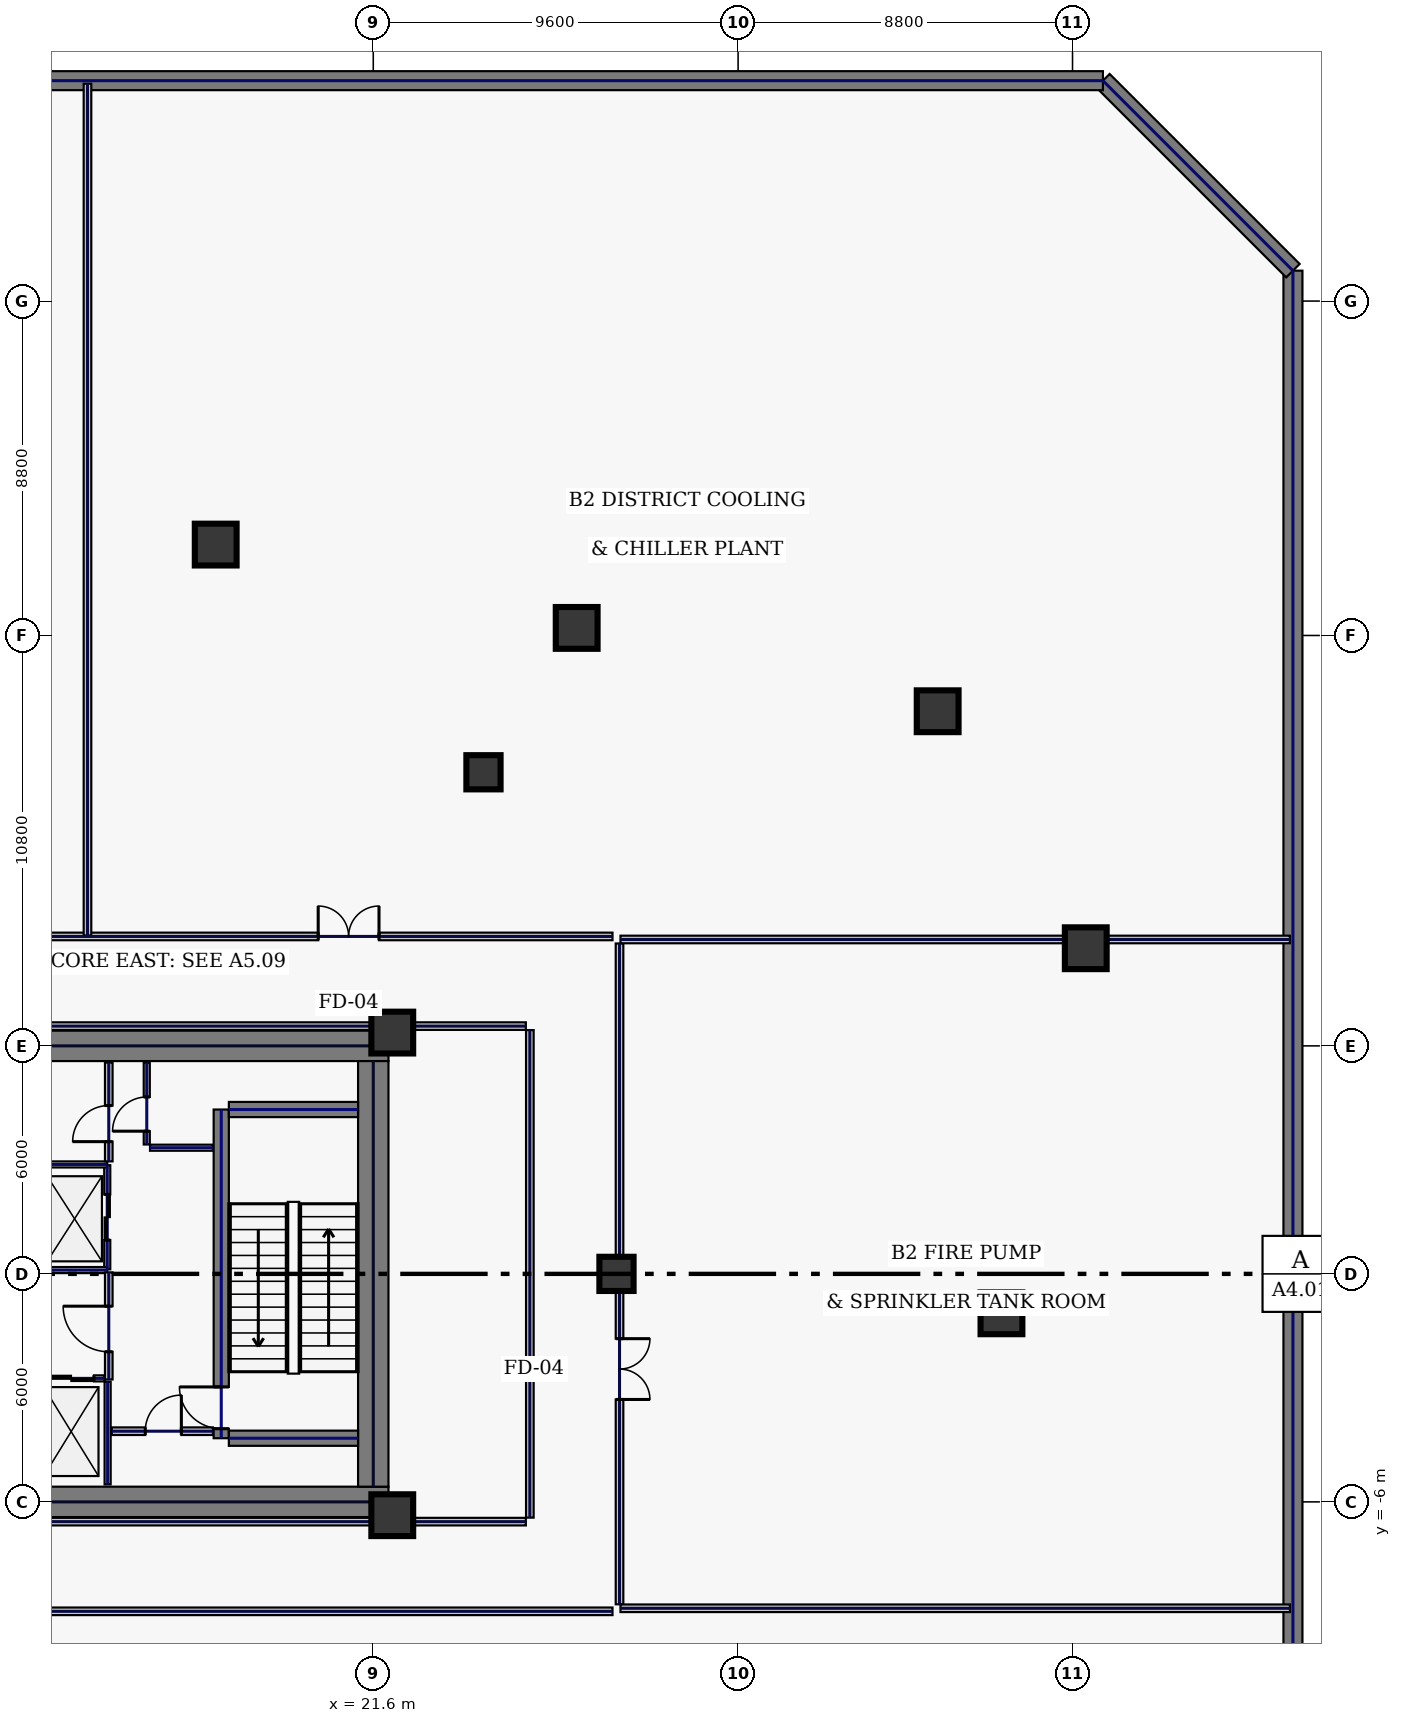
"""IFC4 building model, lengths in metres.
Left out: names, types, materials, properties, quantities, classifications, styles, units other than length and angle.
Written with IfcOpenShell. Run it as: python <this file> out.ifc"""

import sys

from ifc_helpers import new_model, si_unit, direction, frame, frame_2d, origin, origin_2d, place, context, subcontext, project, spatial, rectangle, extrude, element, fill, save


model = new_model("IFC4")
c1 = context("Model", 3, precision=1e-05, world=origin(), true_north=direction((0.0, 1.0)))
c2 = subcontext(c1, "Body", "Model", "MODEL_VIEW")
j1 = project(units=[si_unit("LENGTHUNIT", "METRE"), si_unit("PLANEANGLEUNIT", "RADIAN")], contexts=[c1])
p1 = place(None, origin())
s1 = spatial("IfcSite", under=j1, at=p1, CompositionType="ELEMENT")
p2 = place(p1, origin())
s2 = spatial("IfcBuilding", under=s1, at=p2, CompositionType="ELEMENT")
p3 = place(p2, frame((0.0, 0.0, -10.2)))
s3 = spatial("IfcBuildingStorey", under=s2, at=p3, CompositionType="ELEMENT", Elevation=-10.2)
p4 = place(p3, frame((45.8, -29.8, 0.0), z_axis=(0.0, 0.0, 1.0), x_axis=(0.0, 1.0, 0.0)))
e1 = element("IfcWall", 1, at=p4, inside=s3, PredefinedType="SHEAR", context=c2, shape_type="SweptSolid", body=[
    extrude(rectangle(XDim=56.2, YDim=0.5, at=frame_2d((28.1, 0.0))), origin(), (0.0, 0.0, 1.0), 4.45),
])
p5 = place(p3, frame((45.8, 26.4, 0.0), z_axis=(0.0, 0.0, 1.0), x_axis=(-0.707106781187, 0.707106781187, 0.0)))
e2 = element("IfcWall", 2, at=p5, inside=s3, PredefinedType="SHEAR", context=c2, shape_type="SweptSolid", body=[
    extrude(rectangle(XDim=7.071, YDim=0.5, at=frame_2d((3.536, 0.0))), origin(), (0.0, 0.0, 1.0), 4.45),
])
p6 = place(p3, frame((40.8, 31.4, 0.0), z_axis=(0.0, 0.0, 1.0), x_axis=(-1.0, 0.0, 0.0)))
e3 = element("IfcWall", 3, at=p6, inside=s3, PredefinedType="SHEAR", context=c2, shape_type="SweptSolid", body=[
    extrude(rectangle(XDim=81.6, YDim=0.5, at=frame_2d((40.8, 0.0))), origin(), (0.0, 0.0, 1.0), 4.45),
])
for number, where, z_axis, x_axis in (
    (4, (10.4, 6.0, 0.0), (0.0, 0.0, 1.0), (1.0, 0.0, 0.0)),
    (5, (10.4, -6.0, 0.0), (0.0, 0.0, 1.0), (1.0, 0.0, 0.0)),
):
    element("IfcWall", number, at=place(p3, frame(where, z_axis=z_axis, x_axis=x_axis)), inside=s3, PredefinedType="SHEAR", context=c2, shape_type="SweptSolid", body=[
        extrude(rectangle(XDim=11.6, YDim=0.8, at=frame_2d((5.8, 0.0))), origin(), (0.0, 0.0, 1.0), 4.45),
    ])
p7 = place(p3, frame((21.6, -5.6, 0.0), z_axis=(0.0, 0.0, 1.0), x_axis=(0.0, 1.0, 0.0)))
e6 = element("IfcWall", 6, at=p7, inside=s3, PredefinedType="SHEAR", context=c2, shape_type="SweptSolid", body=[
    extrude(rectangle(XDim=11.2, YDim=0.8, at=frame_2d((5.6, 0.0))), origin(), (0.0, 0.0, 1.0), 4.45),
])
p8 = place(p3, frame((17.6, -4.325, 0.0), z_axis=(0.0, 0.0, 1.0), x_axis=(0.0, 1.0, 0.0)))
e7 = element("IfcWall", 7, at=p8, inside=s3, PredefinedType="SHEAR", context=c2, shape_type="SweptSolid", body=[
    extrude(rectangle(XDim=8.65, YDim=0.4, at=frame_2d((4.325, 0.0))), origin(), (0.0, 0.0, 1.0), 4.45),
])
p9 = place(p8, frame((0.25, 0.0, 0.0)))
e8 = element("IfcOpeningElement", 8, at=p9, cuts=e7, PredefinedType="OPENING", context=c2, shape_type="SweptSolid", body=[
    extrude(rectangle(XDim=1.1, YDim=2.2, at=frame_2d((0.55, 1.1))), frame((0.0, 0.21, 0.0), z_axis=(0.0, -1.0, 0.0), x_axis=(1.0, 0.0, 0.0)), (0.0, 0.0, 1.0), 0.42),
])
for number, where, z_axis, x_axis in (
    (9, (17.8, -4.325, 0.0), (0.0, 0.0, 1.0), (1.0, 0.0, 0.0)),
    (10, (17.8, 4.325, 0.0), (0.0, 0.0, 1.0), (1.0, 0.0, 0.0)),
):
    element("IfcWall", number, at=place(p3, frame(where, z_axis=z_axis, x_axis=x_axis)), inside=s3, PredefinedType="SHEAR", context=c2, shape_type="SweptSolid", body=[
        extrude(rectangle(XDim=3.4, YDim=0.4, at=frame_2d((1.7, 0.0))), origin(), (0.0, 0.0, 1.0), 4.45),
    ])
for number, where, z_axis, x_axis in (
    (11, (22.1, -6.35, 0.0), (0.0, 0.0, 1.0), (1.0, 0.0, 0.0)),
    (12, (22.1, 6.35, 0.0), (0.0, 0.0, 1.0), (1.0, 0.0, 0.0)),
):
    element("IfcColumn", number, at=place(p3, frame(where, z_axis=z_axis, x_axis=x_axis)), inside=s3, PredefinedType="COLUMN", context=c2, shape_type="SweptSolid", body=[
        extrude(rectangle(XDim=1.1, YDim=1.1, at=origin_2d()), origin(), (0.0, 0.0, 1.0), 4.45),
    ])
for number, where, z_axis, x_axis in (
    (13, (24.5, 13.2, 0.0), (0.0, 0.0, 1.0), (1.0, 0.0, 0.0)),
    (14, (28.0, 0.0, 0.0), (0.0, 0.0, 1.0), (1.0, 0.0, 0.0)),
):
    element("IfcColumn", number, at=place(p3, frame(where, z_axis=z_axis, x_axis=x_axis)), inside=s3, PredefinedType="COLUMN", context=c2, shape_type="SweptSolid", body=[
        extrude(rectangle(XDim=0.9, YDim=0.9, at=origin_2d()), origin(), (0.0, 0.0, 1.0), 4.45),
    ])
for number, where, z_axis, x_axis in (
    (15, (36.451, 14.806, 0.0), (0.0, 0.0, 1.0), (1.0, 0.0, 0.0)),
    (16, (26.952, 16.999, 0.0), (0.0, 0.0, 1.0), (1.0, 0.0, 0.0)),
    (17, (17.454, 19.192, 0.0), (0.0, 0.0, 1.0), (1.0, 0.0, 0.0)),
    (18, (38.13, -1.038, 0.0), (0.0, 0.0, 1.0), (1.0, 0.0, 0.0)),
    (19, (40.348, 8.57, 0.0), (0.0, 0.0, 1.0), (1.0, 0.0, 0.0)),
):
    element("IfcColumn", number, at=place(p3, frame(where, z_axis=z_axis, x_axis=x_axis)), inside=s3, PredefinedType="COLUMN", context=c2, shape_type="SweptSolid", body=[
        extrude(rectangle(XDim=1.1, YDim=1.1, at=origin_2d()), origin(), (0.0, 0.0, 1.0), 4.45),
    ])
p10 = place(p3, frame((14.6, 0.12, 0.0), z_axis=(0.0, 0.0, 1.0), x_axis=(0.0, 1.0, 0.0)))
e20 = element("IfcWall", 20, at=p10, inside=s3, PredefinedType="PARTITIONING", context=c2, shape_type="SweptSolid", body=[
    extrude(rectangle(XDim=2.74, YDim=0.16, at=frame_2d((1.37, 0.0))), origin(), (0.0, 0.0, 1.0), 4.45),
])
p11 = place(p10, frame((0.77, 0.0, 0.0)))
e21 = element("IfcOpeningElement", 21, at=p11, cuts=e20, PredefinedType="OPENING", context=c2, shape_type="SweptSolid", body=[
    extrude(rectangle(XDim=1.2, YDim=2.2, at=frame_2d((0.6, 1.1))), frame((0.0, 0.09, 0.0), z_axis=(0.0, -1.0, 0.0), x_axis=(1.0, 0.0, 0.0)), (0.0, 0.0, 1.0), 0.18),
])
for number, where, z_axis, x_axis in (
    (22, (12.84, 0.1, 0.0), (0.0, 0.0, 1.0), (1.0, 0.0, 0.0)),
    (23, (12.84, 2.88, 0.0), (0.0, 0.0, 1.0), (1.0, 0.0, 0.0)),
):
    element("IfcWall", number, at=place(p3, frame(where, z_axis=z_axis, x_axis=x_axis)), inside=s3, PredefinedType="PARTITIONING", context=c2, shape_type="SweptSolid", body=[
        extrude(rectangle(XDim=1.76, YDim=0.16, at=frame_2d((0.88, 0.0))), origin(), (0.0, 0.0, 1.0), 4.45),
    ])
p12 = place(p3, frame((12.77, -2.75, 0.0), z_axis=(0.0, 0.0, 1.0), x_axis=(1.0, 0.0, 0.0)))
e24 = element("IfcWall", 24, at=p12, inside=s3, PredefinedType="PARTITIONING", context=c2, shape_type="SweptSolid", body=[
    extrude(rectangle(XDim=1.76, YDim=0.16, at=frame_2d((0.88, 0.0))), origin(), (0.0, 0.0, 1.0), 4.45),
])
p13 = place(p12, frame((0.28, 0.0, 0.0)))
e25 = element("IfcOpeningElement", 25, at=p13, cuts=e24, PredefinedType="OPENING", context=c2, shape_type="SweptSolid", body=[
    extrude(rectangle(XDim=1.2, YDim=2.2, at=frame_2d((0.6, 1.1))), frame((0.0, 0.09, 0.0), z_axis=(0.0, -1.0, 0.0), x_axis=(1.0, 0.0, 0.0)), (0.0, 0.0, 1.0), 0.18),
])
p14 = place(p3, frame((14.61, -5.54, 0.0), z_axis=(0.0, 0.0, 1.0), x_axis=(0.0, 1.0, 0.0)))
e26 = element("IfcWall", 26, at=p14, inside=s3, PredefinedType="PARTITIONING", context=c2, shape_type="SweptSolid", body=[
    extrude(rectangle(XDim=2.7, YDim=0.16, at=frame_2d((1.35, 0.0))), origin(), (0.0, 0.0, 1.0), 4.45),
])
p15 = place(p3, frame((15.64, 3.405, 0.0), z_axis=(0.0, 0.0, 1.0), x_axis=(0.0, 1.0, 0.0)))
e27 = element("IfcWall", 27, at=p15, inside=s3, PredefinedType="PARTITIONING", context=c2, shape_type="SweptSolid", body=[
    extrude(rectangle(XDim=2.155, YDim=0.16, at=frame_2d((1.078, 0.0))), origin(), (0.0, 0.0, 1.0), 4.45),
])
p16 = place(p15, frame((0.35, 0.0, 0.0)))
e28 = element("IfcOpeningElement", 28, at=p16, cuts=e27, PredefinedType="OPENING", context=c2, shape_type="SweptSolid", body=[
    extrude(rectangle(XDim=0.9, YDim=2.2, at=frame_2d((0.45, 1.1))), frame((0.0, 0.09, 0.0), z_axis=(0.0, -1.0, 0.0), x_axis=(1.0, 0.0, 0.0)), (0.0, 0.0, 1.0), 0.18),
])
p17 = place(p3, frame((15.725, 3.32, 0.0), z_axis=(0.0, 0.0, 1.0), x_axis=(1.0, 0.0, 0.0)))
e29 = element("IfcWall", 29, at=p17, inside=s3, PredefinedType="PARTITIONING", context=c2, shape_type="SweptSolid", body=[
    extrude(rectangle(XDim=1.655, YDim=0.16, at=frame_2d((0.827, 0.0))), origin(), (0.0, 0.0, 1.0), 4.45),
])
p18 = place(p3, frame((14.72, -4.14, 0.0), z_axis=(0.0, 0.0, 1.0), x_axis=(1.0, 0.0, 0.0)))
e30 = element("IfcWall", 30, at=p18, inside=s3, PredefinedType="SOLIDWALL", context=c2, shape_type="SweptSolid", body=[
    extrude(rectangle(XDim=2.66, YDim=0.2, at=frame_2d((1.33, 0.0))), origin(), (0.0, 0.0, 1.0), 4.45),
])
p19 = place(p18, frame((0.88, 0.0, 0.0)))
e31 = element("IfcOpeningElement", 31, at=p19, cuts=e30, PredefinedType="OPENING", context=c2, shape_type="SweptSolid", body=[
    extrude(rectangle(XDim=0.95, YDim=2.2, at=frame_2d((0.475, 1.1))), frame((0.0, 0.11, 0.0), z_axis=(0.0, -1.0, 0.0), x_axis=(1.0, 0.0, 0.0)), (0.0, 0.0, 1.0), 0.22),
])
p20 = place(p3, frame((14.64, 2.96, 0.0), z_axis=(0.0, 0.0, 1.0), x_axis=(0.0, 1.0, 0.0)))
e32 = element("IfcWall", 32, at=p20, inside=s3, PredefinedType="SOLIDWALL", context=c2, shape_type="SweptSolid", body=[
    extrude(rectangle(XDim=2.6, YDim=0.2, at=frame_2d((1.3, 0.0))), origin(), (0.0, 0.0, 1.0), 4.45),
])
p21 = place(p20, frame((0.52, 0.0, 0.0)))
e33 = element("IfcOpeningElement", 33, at=p21, cuts=e32, PredefinedType="OPENING", context=c2, shape_type="SweptSolid", body=[
    extrude(rectangle(XDim=0.95, YDim=2.2, at=frame_2d((0.475, 1.1))), frame((0.0, 0.11, 0.0), z_axis=(0.0, -1.0, 0.0), x_axis=(1.0, 0.0, 0.0)), (0.0, 0.0, 1.0), 0.22),
])
p22 = place(p3, frame((14.64, -2.78, 0.0), z_axis=(0.0, 0.0, 1.0), x_axis=(0.0, 1.0, 0.0)))
e34 = element("IfcWall", 34, at=p22, inside=s3, PredefinedType="SOLIDWALL", context=c2, shape_type="SweptSolid", body=[
    extrude(rectangle(XDim=2.82, YDim=0.2, at=frame_2d((1.41, 0.0))), origin(), (0.0, 0.0, 1.0), 4.45),
])
p23 = place(p22, frame((0.73, 0.0, 0.0)))
e35 = element("IfcOpeningElement", 35, at=p23, cuts=e34, PredefinedType="OPENING", context=c2, shape_type="SweptSolid", body=[
    extrude(rectangle(XDim=1.2, YDim=2.2, at=frame_2d((0.6, 1.1))), frame((0.0, 0.11, 0.0), z_axis=(0.0, -1.0, 0.0), x_axis=(1.0, 0.0, 0.0)), (0.0, 0.0, 1.0), 0.22),
])
p24 = place(p3, frame((-27.895, 8.88, 0.0), z_axis=(0.0, 0.0, 1.0), x_axis=(1.0, 0.0, 0.0)))
e36 = element("IfcWall", 36, at=p24, inside=s3, PredefinedType="SOLIDWALL", context=c2, shape_type="SweptSolid", body=[
    extrude(rectangle(XDim=55.79, YDim=0.2, at=frame_2d((27.895, 0.0))), origin(), (0.0, 0.0, 1.0), 4.45),
])
p25 = place(p24, frame((6.434, 0.0, 0.0)))
e37 = element("IfcOpeningElement", 37, at=p25, cuts=e36, PredefinedType="OPENING", context=c2, shape_type="SweptSolid", body=[
    extrude(rectangle(XDim=1.6, YDim=2.3, at=frame_2d((0.8, 1.15))), frame((0.0, 0.11, 0.0), z_axis=(0.0, -1.0, 0.0), x_axis=(1.0, 0.0, 0.0)), (0.0, 0.0, 1.0), 0.22),
])
p26 = place(p24, frame((27.28, 0.0, 0.0)))
e38 = element("IfcOpeningElement", 38, at=p26, cuts=e36, PredefinedType="OPENING", context=c2, shape_type="SweptSolid", body=[
    extrude(rectangle(XDim=1.6, YDim=2.3, at=frame_2d((0.8, 1.15))), frame((0.0, 0.11, 0.0), z_axis=(0.0, -1.0, 0.0), x_axis=(1.0, 0.0, 0.0)), (0.0, 0.0, 1.0), 0.22),
])
p27 = place(p24, frame((48.046, 0.0, 0.0)))
e39 = element("IfcOpeningElement", 39, at=p27, cuts=e36, PredefinedType="OPENING", context=c2, shape_type="SweptSolid", body=[
    extrude(rectangle(XDim=1.6, YDim=2.3, at=frame_2d((0.8, 1.15))), frame((0.0, 0.11, 0.0), z_axis=(0.0, -1.0, 0.0), x_axis=(1.0, 0.0, 0.0)), (0.0, 0.0, 1.0), 0.22),
])
p28 = place(p3, frame((28.08, 8.695, 0.0), z_axis=(0.0, 0.0, 1.0), x_axis=(0.0, -1.0, 0.0)))
e40 = element("IfcWall", 40, at=p28, inside=s3, PredefinedType="SOLIDWALL", context=c2, shape_type="SweptSolid", body=[
    extrude(rectangle(XDim=17.39, YDim=0.2, at=frame_2d((8.695, 0.0))), origin(), (0.0, 0.0, 1.0), 4.45),
])
p29 = place(p28, frame((10.4, 0.0, 0.0)))
e41 = element("IfcOpeningElement", 41, at=p29, cuts=e40, PredefinedType="OPENING", context=c2, shape_type="SweptSolid", body=[
    extrude(rectangle(XDim=1.6, YDim=2.3, at=frame_2d((0.8, 1.15))), frame((0.0, 0.11, 0.0), z_axis=(0.0, -1.0, 0.0), x_axis=(1.0, 0.0, 0.0)), (0.0, 0.0, 1.0), 0.22),
])
p30 = place(p3, frame((27.895, -8.88, 0.0), z_axis=(0.0, 0.0, 1.0), x_axis=(-1.0, 0.0, 0.0)))
e42 = element("IfcWall", 42, at=p30, inside=s3, PredefinedType="SOLIDWALL", context=c2, shape_type="SweptSolid", body=[
    extrude(rectangle(XDim=55.79, YDim=0.2, at=frame_2d((27.895, 0.0))), origin(), (0.0, 0.0, 1.0), 4.45),
])
p31 = place(p30, frame((27.2, 0.0, 0.0)))
e43 = element("IfcOpeningElement", 43, at=p31, cuts=e42, PredefinedType="OPENING", context=c2, shape_type="SweptSolid", body=[
    extrude(rectangle(XDim=1.6, YDim=2.3, at=frame_2d((0.8, 1.15))), frame((0.0, 0.11, 0.0), z_axis=(0.0, -1.0, 0.0), x_axis=(1.0, 0.0, 0.0)), (0.0, 0.0, 1.0), 0.22),
])
for number, where, z_axis, x_axis in (
    (44, (25.615, 6.52, 0.0), (0.0, 0.0, 1.0), (-1.0, 0.0, 0.0)),
    (45, (10.38, -6.52, 0.0), (0.0, 0.0, 1.0), (1.0, 0.0, 0.0)),
):
    element("IfcWall", number, at=place(p3, frame(where, z_axis=z_axis, x_axis=x_axis)), inside=s3, PredefinedType="SOLIDWALL", context=c2, shape_type="SweptSolid", body=[
        extrude(rectangle(XDim=15.235, YDim=0.2, at=frame_2d((7.618, 0.0))), origin(), (0.0, 0.0, 1.0), 4.45),
    ])
p32 = place(p3, frame((25.72, -6.415, 0.0), z_axis=(0.0, 0.0, 1.0), x_axis=(0.0, 1.0, 0.0)))
e46 = element("IfcWall", 46, at=p32, inside=s3, PredefinedType="SOLIDWALL", context=c2, shape_type="SweptSolid", body=[
    extrude(rectangle(XDim=12.83, YDim=0.2, at=frame_2d((6.415, 0.0))), origin(), (0.0, 0.0, 1.0), 4.45),
])
for number, where, z_axis, x_axis in (
    (47, (28.105, -8.8, 0.0), (0.0, 0.0, 1.0), (1.0, 0.0, 0.0)),
    (48, (28.105, 8.8, 0.0), (0.0, 0.0, 1.0), (1.0, 0.0, 0.0)),
):
    element("IfcWall", number, at=place(p3, frame(where, z_axis=z_axis, x_axis=x_axis)), inside=s3, PredefinedType="SOLIDWALL", context=c2, shape_type="SweptSolid", body=[
        extrude(rectangle(XDim=17.615, YDim=0.2, at=frame_2d((8.808, 0.0))), origin(), (0.0, 0.0, 1.0), 4.45),
    ])
p33 = place(p3, frame((14.08, 8.905, 0.0), z_axis=(0.0, 0.0, 1.0), x_axis=(0.0, 1.0, 0.0)))
e49 = element("IfcWall", 49, at=p33, inside=s3, PredefinedType="SOLIDWALL", context=c2, shape_type="SweptSolid", body=[
    extrude(rectangle(XDim=22.415, YDim=0.2, at=frame_2d((11.208, 0.0))), origin(), (0.0, 0.0, 1.0), 4.45),
])
p34 = place(p9, origin())
e50 = element("IfcDoor", 50, at=p34, inside=s3, OperationType="SINGLE_SWING_RIGHT", PredefinedType="DOOR", context=c2, shape_type="SweptSolid", body=[
    extrude(rectangle(XDim=1.1, YDim=2.2, at=frame_2d((0.55, 1.1))), frame((0.0, 0.025, 0.0), z_axis=(0.0, -1.0, 0.0), x_axis=(1.0, 0.0, 0.0)), (0.0, 0.0, 1.0), 0.05),
])
fill(e8, e50)
p35 = place(p11, origin())
e51 = element("IfcDoor", 51, at=p35, inside=s3, OperationType="SLIDING_TO_LEFT", PredefinedType="DOOR", context=c2, shape_type="SweptSolid", body=[
    extrude(rectangle(XDim=1.2, YDim=2.2, at=frame_2d((0.6, 1.1))), frame((0.0, 0.025, 0.0), z_axis=(0.0, -1.0, 0.0), x_axis=(1.0, 0.0, 0.0)), (0.0, 0.0, 1.0), 0.05),
])
fill(e21, e51)
p36 = place(p13, origin())
e52 = element("IfcDoor", 52, at=p36, inside=s3, OperationType="SLIDING_TO_LEFT", PredefinedType="DOOR", context=c2, shape_type="SweptSolid", body=[
    extrude(rectangle(XDim=1.2, YDim=2.2, at=frame_2d((0.6, 1.1))), frame((0.0, 0.025, 0.0), z_axis=(0.0, -1.0, 0.0), x_axis=(1.0, 0.0, 0.0)), (0.0, 0.0, 1.0), 0.05),
])
fill(e25, e52)
p37 = place(p16, origin())
e53 = element("IfcDoor", 53, at=p37, inside=s3, OperationType="SINGLE_SWING_LEFT", PredefinedType="DOOR", context=c2, shape_type="SweptSolid", body=[
    extrude(rectangle(XDim=0.9, YDim=2.2, at=frame_2d((0.45, 1.1))), frame((0.0, 0.025, 0.0), z_axis=(0.0, -1.0, 0.0), x_axis=(1.0, 0.0, 0.0)), (0.0, 0.0, 1.0), 0.05),
])
fill(e28, e53)
p38 = place(p19, origin())
e54 = element("IfcDoor", 54, at=p38, inside=s3, OperationType="SINGLE_SWING_RIGHT", PredefinedType="DOOR", context=c2, shape_type="SweptSolid", body=[
    extrude(rectangle(XDim=0.95, YDim=2.2, at=frame_2d((0.475, 1.1))), frame((0.0, 0.025, 0.0), z_axis=(0.0, -1.0, 0.0), x_axis=(1.0, 0.0, 0.0)), (0.0, 0.0, 1.0), 0.05),
])
fill(e31, e54)
p39 = place(p21, origin())
e55 = element("IfcDoor", 55, at=p39, inside=s3, OperationType="SINGLE_SWING_LEFT", PredefinedType="DOOR", context=c2, shape_type="SweptSolid", body=[
    extrude(rectangle(XDim=0.95, YDim=2.2, at=frame_2d((0.475, 1.1))), frame((0.0, 0.025, 0.0), z_axis=(0.0, -1.0, 0.0), x_axis=(1.0, 0.0, 0.0)), (0.0, 0.0, 1.0), 0.05),
])
fill(e33, e55)
p40 = place(p23, origin())
e56 = element("IfcDoor", 56, at=p40, inside=s3, OperationType="SINGLE_SWING_RIGHT", PredefinedType="DOOR", context=c2, shape_type="SweptSolid", body=[
    extrude(rectangle(XDim=1.2, YDim=2.2, at=frame_2d((0.6, 1.1))), frame((0.0, 0.025, 0.0), z_axis=(0.0, -1.0, 0.0), x_axis=(1.0, 0.0, 0.0)), (0.0, 0.0, 1.0), 0.05),
])
fill(e35, e56)
p41 = place(p27, origin())
e57 = element("IfcDoor", 57, at=p41, inside=s3, OperationType="DOUBLE_SWING_LEFT", PredefinedType="DOOR", context=c2, shape_type="SweptSolid", body=[
    extrude(rectangle(XDim=1.6, YDim=2.3, at=frame_2d((0.8, 1.15))), frame((0.0, 0.025, 0.0), z_axis=(0.0, -1.0, 0.0), x_axis=(1.0, 0.0, 0.0)), (0.0, 0.0, 1.0), 0.05),
])
fill(e39, e57)
p42 = place(p29, origin())
e58 = element("IfcDoor", 58, at=p42, inside=s3, OperationType="DOUBLE_SWING_LEFT", PredefinedType="DOOR", context=c2, shape_type="SweptSolid", body=[
    extrude(rectangle(XDim=1.6, YDim=2.3, at=frame_2d((0.8, 1.15))), frame((0.0, 0.025, 0.0), z_axis=(0.0, -1.0, 0.0), x_axis=(1.0, 0.0, 0.0)), (0.0, 0.0, 1.0), 0.05),
])
fill(e41, e58)
save(model, sys.argv[1])
